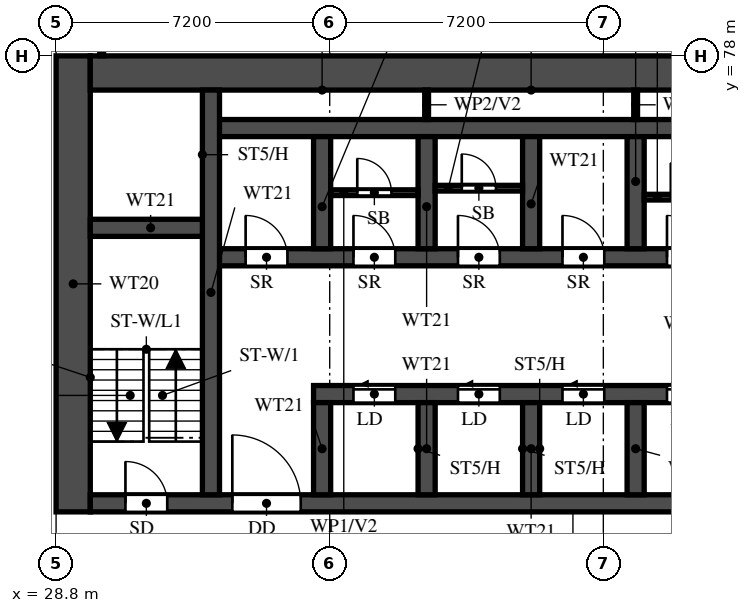
"""IFC4 building model, lengths in metres.
Left out: names, types, materials, properties, quantities, classifications, styles, units other than length and angle.
Written with IfcOpenShell. Run it as: python <this file> out.ifc"""

import sys

from ifc_helpers import new_model, si_unit, direction, frame, frame_2d, origin, place, context, subcontext, project, spatial, rectangle, extrude, element, fill, save


model = new_model("IFC4")
c1 = context("Model", 3, precision=1e-05, world=origin(), true_north=direction((0.0, 1.0)))
c2 = subcontext(c1, "Body", "Model", "MODEL_VIEW")
j1 = project(units=[si_unit("LENGTHUNIT", "METRE"), si_unit("PLANEANGLEUNIT", "RADIAN")], contexts=[c1])
p1 = place(None, origin())
s1 = spatial("IfcSite", under=j1, at=p1, CompositionType="ELEMENT")
p2 = place(p1, origin())
s2 = spatial("IfcBuilding", under=s1, at=p2, CompositionType="ELEMENT")
p3 = place(p2, frame((0.0, 0.0, 27.0)))
s3 = spatial("IfcBuildingStorey", under=s2, at=p3, CompositionType="ELEMENT", Elevation=27.0)
p4 = place(p3, frame((29.25, 66.0, 0.0), z_axis=(0.0, 0.0, 1.0), x_axis=(0.0, 1.0, 0.0)))
e1 = element("IfcWall", 1, at=p4, inside=s3, PredefinedType="SHEAR", context=c2, shape_type="SweptSolid", body=[
    extrude(rectangle(XDim=12.0, YDim=0.9, at=frame_2d((6.0, 0.0))), origin(), (0.0, 0.0, 1.0), 3.18),
])
p5 = place(p3, frame((29.7, 77.55, 0.0), z_axis=(0.0, 0.0, 1.0), x_axis=(1.0, 0.0, 0.0)))
e2 = element("IfcWall", 2, at=p5, inside=s3, PredefinedType="SHEAR", context=c2, shape_type="SweptSolid", body=[
    extrude(rectangle(XDim=41.4, YDim=0.9, at=frame_2d((20.7, 0.0))), origin(), (0.0, 0.0, 1.0), 3.18),
])
p6 = place(p3, frame((29.7, 66.225, 0.0), z_axis=(0.0, 0.0, 1.0), x_axis=(1.0, 0.0, 0.0)))
e3 = element("IfcWall", 3, at=p6, inside=s3, PredefinedType="SHEAR", context=c2, shape_type="SweptSolid", body=[
    extrude(rectangle(XDim=41.4, YDim=0.45, at=frame_2d((20.7, 0.0))), origin(), (0.0, 0.0, 1.0), 3.18),
])
p7 = place(p6, frame((0.925, 0.0, 0.0)))
e4 = element("IfcOpeningElement", 4, at=p7, cuts=e3, PredefinedType="OPENING", context=c2, shape_type="SweptSolid", body=[
    extrude(rectangle(XDim=1.1, YDim=2.1, at=frame_2d((0.55, 1.05))), frame((0.0, 0.235, 0.0), z_axis=(0.0, -1.0, 0.0), x_axis=(1.0, 0.0, 0.0)), (0.0, 0.0, 1.0), 0.47),
])
p8 = place(p6, frame((3.738, 0.0, 0.0)))
e5 = element("IfcOpeningElement", 5, at=p8, cuts=e3, PredefinedType="OPENING", context=c2, shape_type="SweptSolid", body=[
    extrude(rectangle(XDim=1.8, YDim=2.1, at=frame_2d((0.9, 1.05))), frame((0.0, 0.235, 0.0), z_axis=(0.0, -1.0, 0.0), x_axis=(1.0, 0.0, 0.0)), (0.0, 0.0, 1.0), 0.47),
])
p9 = place(p3, frame((35.575, 69.1, 0.0), z_axis=(0.0, 0.0, 1.0), x_axis=(1.0, 0.0, 0.0)))
e6 = element("IfcWall", 6, at=p9, inside=s3, PredefinedType="SHEAR", context=c2, shape_type="SweptSolid", body=[
    extrude(rectangle(XDim=24.2, YDim=0.45, at=frame_2d((12.1, 0.0))), origin(), (0.0, 0.0, 1.0), 3.18),
])
p10 = place(p9, frame((1.05, 0.0, 0.0)))
e7 = element("IfcOpeningElement", 7, at=p10, cuts=e6, PredefinedType="OPENING", context=c2, shape_type="SweptSolid", body=[
    extrude(rectangle(XDim=1.1, YDim=2.1, at=frame_2d((0.55, 1.05))), frame((0.0, 0.235, 0.0), z_axis=(0.0, -1.0, 0.0), x_axis=(1.0, 0.0, 0.0)), (0.0, 0.0, 1.0), 0.47),
])
p11 = place(p9, frame((3.8, 0.0, 0.0)))
e8 = element("IfcOpeningElement", 8, at=p11, cuts=e6, PredefinedType="OPENING", context=c2, shape_type="SweptSolid", body=[
    extrude(rectangle(XDim=1.1, YDim=2.1, at=frame_2d((0.55, 1.05))), frame((0.0, 0.235, 0.0), z_axis=(0.0, -1.0, 0.0), x_axis=(1.0, 0.0, 0.0)), (0.0, 0.0, 1.0), 0.47),
])
p12 = place(p9, frame((6.55, 0.0, 0.0)))
e9 = element("IfcOpeningElement", 9, at=p12, cuts=e6, PredefinedType="OPENING", context=c2, shape_type="SweptSolid", body=[
    extrude(rectangle(XDim=1.1, YDim=2.1, at=frame_2d((0.55, 1.05))), frame((0.0, 0.235, 0.0), z_axis=(0.0, -1.0, 0.0), x_axis=(1.0, 0.0, 0.0)), (0.0, 0.0, 1.0), 0.47),
])
p13 = place(p9, frame((9.3, 0.0, 0.0)))
e10 = element("IfcOpeningElement", 10, at=p13, cuts=e6, PredefinedType="OPENING", context=c2, shape_type="SweptSolid", body=[
    extrude(rectangle(XDim=1.1, YDim=2.1, at=frame_2d((0.55, 1.05))), frame((0.0, 0.235, 0.0), z_axis=(0.0, -1.0, 0.0), x_axis=(1.0, 0.0, 0.0)), (0.0, 0.0, 1.0), 0.47),
])
p14 = place(p9, frame((12.05, 0.0, 0.0)))
e11 = element("IfcOpeningElement", 11, at=p14, cuts=e6, PredefinedType="OPENING", context=c2, shape_type="SweptSolid", body=[
    extrude(rectangle(XDim=1.1, YDim=2.1, at=frame_2d((0.55, 1.05))), frame((0.0, 0.235, 0.0), z_axis=(0.0, -1.0, 0.0), x_axis=(1.0, 0.0, 0.0)), (0.0, 0.0, 1.0), 0.47),
])
p15 = place(p9, frame((14.8, 0.0, 0.0)))
e12 = element("IfcOpeningElement", 12, at=p15, cuts=e6, PredefinedType="OPENING", context=c2, shape_type="SweptSolid", body=[
    extrude(rectangle(XDim=1.1, YDim=2.1, at=frame_2d((0.55, 1.05))), frame((0.0, 0.235, 0.0), z_axis=(0.0, -1.0, 0.0), x_axis=(1.0, 0.0, 0.0)), (0.0, 0.0, 1.0), 0.47),
])
p16 = place(p3, frame((32.875, 72.7, 0.0), z_axis=(0.0, 0.0, 1.0), x_axis=(1.0, 0.0, 0.0)))
e13 = element("IfcWall", 13, at=p16, inside=s3, PredefinedType="SHEAR", context=c2, shape_type="SweptSolid", body=[
    extrude(rectangle(XDim=35.05, YDim=0.45, at=frame_2d((17.525, 0.0))), origin(), (0.0, 0.0, 1.0), 3.18),
])
p17 = place(p16, frame((19.8, 0.0, 0.0)))
e14 = element("IfcOpeningElement", 14, at=p17, cuts=e13, PredefinedType="OPENING", context=c2, shape_type="SweptSolid", body=[
    extrude(rectangle(XDim=1.1, YDim=2.1, at=frame_2d((0.55, 1.05))), frame((0.0, 0.235, 0.0), z_axis=(0.0, -1.0, 0.0), x_axis=(1.0, 0.0, 0.0)), (0.0, 0.0, 1.0), 0.47),
])
p18 = place(p16, frame((27.65, 0.0, 0.0)))
e15 = element("IfcOpeningElement", 15, at=p18, cuts=e13, PredefinedType="OPENING", context=c2, shape_type="SweptSolid", body=[
    extrude(rectangle(XDim=1.1, YDim=2.1, at=frame_2d((0.55, 1.05))), frame((0.0, 0.235, 0.0), z_axis=(0.0, -1.0, 0.0), x_axis=(1.0, 0.0, 0.0)), (0.0, 0.0, 1.0), 0.47),
])
p19 = place(p16, frame((30.25, 0.0, 0.0)))
e16 = element("IfcOpeningElement", 16, at=p19, cuts=e13, PredefinedType="OPENING", context=c2, shape_type="SweptSolid", body=[
    extrude(rectangle(XDim=1.1, YDim=2.1, at=frame_2d((0.55, 1.05))), frame((0.0, 0.235, 0.0), z_axis=(0.0, -1.0, 0.0), x_axis=(1.0, 0.0, 0.0)), (0.0, 0.0, 1.0), 0.47),
])
p20 = place(p16, frame((3.75, 0.0, 0.0)))
e17 = element("IfcOpeningElement", 17, at=p20, cuts=e13, PredefinedType="OPENING", context=c2, shape_type="SweptSolid", body=[
    extrude(rectangle(XDim=1.1, YDim=2.1, at=frame_2d((0.55, 1.05))), frame((0.0, 0.235, 0.0), z_axis=(0.0, -1.0, 0.0), x_axis=(1.0, 0.0, 0.0)), (0.0, 0.0, 1.0), 0.47),
])
p21 = place(p16, frame((6.5, 0.0, 0.0)))
e18 = element("IfcOpeningElement", 18, at=p21, cuts=e13, PredefinedType="OPENING", context=c2, shape_type="SweptSolid", body=[
    extrude(rectangle(XDim=1.1, YDim=2.1, at=frame_2d((0.55, 1.05))), frame((0.0, 0.235, 0.0), z_axis=(0.0, -1.0, 0.0), x_axis=(1.0, 0.0, 0.0)), (0.0, 0.0, 1.0), 0.47),
])
p22 = place(p16, frame((9.25, 0.0, 0.0)))
e19 = element("IfcOpeningElement", 19, at=p22, cuts=e13, PredefinedType="OPENING", context=c2, shape_type="SweptSolid", body=[
    extrude(rectangle(XDim=1.1, YDim=2.1, at=frame_2d((0.55, 1.05))), frame((0.0, 0.235, 0.0), z_axis=(0.0, -1.0, 0.0), x_axis=(1.0, 0.0, 0.0)), (0.0, 0.0, 1.0), 0.47),
])
p23 = place(p16, frame((12.0, 0.0, 0.0)))
e20 = element("IfcOpeningElement", 20, at=p23, cuts=e13, PredefinedType="OPENING", context=c2, shape_type="SweptSolid", body=[
    extrude(rectangle(XDim=1.1, YDim=2.1, at=frame_2d((0.55, 1.05))), frame((0.0, 0.235, 0.0), z_axis=(0.0, -1.0, 0.0), x_axis=(1.0, 0.0, 0.0)), (0.0, 0.0, 1.0), 0.47),
])
p24 = place(p16, frame((14.75, 0.0, 0.0)))
e21 = element("IfcOpeningElement", 21, at=p24, cuts=e13, PredefinedType="OPENING", context=c2, shape_type="SweptSolid", body=[
    extrude(rectangle(XDim=1.1, YDim=2.1, at=frame_2d((0.55, 1.05))), frame((0.0, 0.235, 0.0), z_axis=(0.0, -1.0, 0.0), x_axis=(1.0, 0.0, 0.0)), (0.0, 0.0, 1.0), 0.47),
])
p25 = place(p16, frame((17.5, 0.0, 0.0)))
e22 = element("IfcOpeningElement", 22, at=p25, cuts=e13, PredefinedType="OPENING", context=c2, shape_type="SweptSolid", body=[
    extrude(rectangle(XDim=1.1, YDim=2.1, at=frame_2d((0.55, 1.05))), frame((0.0, 0.235, 0.0), z_axis=(0.0, -1.0, 0.0), x_axis=(1.0, 0.0, 0.0)), (0.0, 0.0, 1.0), 0.47),
])
p26 = place(p16, frame((0.913, 0.0, 0.0)))
e23 = element("IfcOpeningElement", 23, at=p26, cuts=e13, PredefinedType="OPENING", context=c2, shape_type="SweptSolid", body=[
    extrude(rectangle(XDim=1.1, YDim=2.1, at=frame_2d((0.55, 1.05))), frame((0.0, 0.235, 0.0), z_axis=(0.0, -1.0, 0.0), x_axis=(1.0, 0.0, 0.0)), (0.0, 0.0, 1.0), 0.47),
])
p27 = place(p3, frame((32.875, 76.1, 0.0), z_axis=(0.0, 0.0, 1.0), x_axis=(1.0, 0.0, 0.0)))
e24 = element("IfcWall", 24, at=p27, inside=s3, PredefinedType="SHEAR", context=c2, shape_type="SweptSolid", body=[
    extrude(rectangle(XDim=35.05, YDim=0.45, at=frame_2d((17.525, 0.0))), origin(), (0.0, 0.0, 1.0), 3.18),
])
p28 = place(p3, frame((29.7, 73.475, 0.0), z_axis=(0.0, 0.0, 1.0), x_axis=(1.0, 0.0, 0.0)))
e25 = element("IfcWall", 25, at=p28, inside=s3, PredefinedType="SHEAR", context=c2, shape_type="SweptSolid", body=[
    extrude(rectangle(XDim=3.175, YDim=0.45, at=frame_2d((1.587, 0.0))), origin(), (0.0, 0.0, 1.0), 3.18),
])
p29 = place(p3, frame((32.875, 66.45, 0.0), z_axis=(0.0, 0.0, 1.0), x_axis=(0.0, 1.0, 0.0)))
e26 = element("IfcWall", 26, at=p29, inside=s3, PredefinedType="SHEAR", context=c2, shape_type="SweptSolid", body=[
    extrude(rectangle(XDim=10.65, YDim=0.45, at=frame_2d((5.325, 0.0))), origin(), (0.0, 0.0, 1.0), 3.18),
])
for number, where, z_axis, x_axis in (
    (27, (35.8, 66.45, 0.0), (0.0, 0.0, 1.0), (0.0, 1.0, 0.0)),
    (28, (38.55, 66.45, 0.0), (0.0, 0.0, 1.0), (0.0, 1.0, 0.0)),
    (29, (41.3, 66.45, 0.0), (0.0, 0.0, 1.0), (0.0, 1.0, 0.0)),
    (30, (44.05, 66.45, 0.0), (0.0, 0.0, 1.0), (0.0, 1.0, 0.0)),
):
    element("IfcWall", number, at=place(p3, frame(where, z_axis=z_axis, x_axis=x_axis)), inside=s3, PredefinedType="SHEAR", context=c2, shape_type="SweptSolid", body=[
        extrude(rectangle(XDim=2.425, YDim=0.45, at=frame_2d((1.212, 0.0))), origin(), (0.0, 0.0, 1.0), 3.18),
    ])
for number, where, z_axis, x_axis in (
    (31, (35.8, 72.925, 0.0), (0.0, 0.0, 1.0), (0.0, 1.0, 0.0)),
    (32, (38.55, 72.925, 0.0), (0.0, 0.0, 1.0), (0.0, 1.0, 0.0)),
    (33, (41.3, 72.925, 0.0), (0.0, 0.0, 1.0), (0.0, 1.0, 0.0)),
    (34, (44.05, 72.925, 0.0), (0.0, 0.0, 1.0), (0.0, 1.0, 0.0)),
):
    element("IfcWall", number, at=place(p3, frame(where, z_axis=z_axis, x_axis=x_axis)), inside=s3, PredefinedType="SHEAR", context=c2, shape_type="SweptSolid", body=[
        extrude(rectangle(XDim=2.95, YDim=0.45, at=frame_2d((1.475, 0.0))), origin(), (0.0, 0.0, 1.0), 3.18),
    ])
p30 = place(p3, frame((36.025, 74.4, 0.0), z_axis=(0.0, 0.0, 1.0), x_axis=(1.0, 0.0, 0.0)))
e35 = element("IfcWall", 35, at=p30, inside=s3, PredefinedType="PARTITIONING", context=c2, shape_type="SweptSolid", body=[
    extrude(rectangle(XDim=2.3, YDim=0.15, at=frame_2d((1.15, 0.0))), origin(), (0.0, 0.0, 1.0), 3.18),
])
p31 = place(p30, frame((0.7, 0.0, 0.0)))
e36 = element("IfcOpeningElement", 36, at=p31, cuts=e35, PredefinedType="OPENING", context=c2, shape_type="SweptSolid", body=[
    extrude(rectangle(XDim=0.9, YDim=2.1, at=frame_2d((0.45, 1.05))), frame((0.0, 0.085, 0.0), z_axis=(0.0, -1.0, 0.0), x_axis=(1.0, 0.0, 0.0)), (0.0, 0.0, 1.0), 0.17),
])
p32 = place(p3, frame((38.775, 74.518, 0.0), z_axis=(0.0, 0.0, 1.0), x_axis=(1.0, 0.0, 0.0)))
e37 = element("IfcWall", 37, at=p32, inside=s3, PredefinedType="PARTITIONING", context=c2, shape_type="SweptSolid", body=[
    extrude(rectangle(XDim=2.3, YDim=0.15, at=frame_2d((1.15, 0.0))), origin(), (0.0, 0.0, 1.0), 3.18),
])
p33 = place(p32, frame((0.7, 0.0, 0.0)))
e38 = element("IfcOpeningElement", 38, at=p33, cuts=e37, PredefinedType="OPENING", context=c2, shape_type="SweptSolid", body=[
    extrude(rectangle(XDim=0.9, YDim=2.1, at=frame_2d((0.45, 1.05))), frame((0.0, 0.085, 0.0), z_axis=(0.0, -1.0, 0.0), x_axis=(1.0, 0.0, 0.0)), (0.0, 0.0, 1.0), 0.17),
])
p34 = place(p3, frame((44.275, 74.282, 0.0), z_axis=(0.0, 0.0, 1.0), x_axis=(1.0, 0.0, 0.0)))
e39 = element("IfcWall", 39, at=p34, inside=s3, PredefinedType="PARTITIONING", context=c2, shape_type="SweptSolid", body=[
    extrude(rectangle(XDim=2.3, YDim=0.15, at=frame_2d((1.15, 0.0))), origin(), (0.0, 0.0, 1.0), 3.18),
])
p35 = place(p34, frame((0.7, 0.0, 0.0)))
e40 = element("IfcOpeningElement", 40, at=p35, cuts=e39, PredefinedType="OPENING", context=c2, shape_type="SweptSolid", body=[
    extrude(rectangle(XDim=0.9, YDim=2.1, at=frame_2d((0.45, 1.05))), frame((0.0, 0.085, 0.0), z_axis=(0.0, -1.0, 0.0), x_axis=(1.0, 0.0, 0.0)), (0.0, 0.0, 1.0), 0.17),
])
for number, where, z_axis, x_axis in (
    (41, (38.55, 76.325, 0.0), (0.0, 0.0, 1.0), (0.0, 1.0, 0.0)),
    (42, (44.05, 76.325, 0.0), (0.0, 0.0, 1.0), (0.0, 1.0, 0.0)),
):
    element("IfcWall", number, at=place(p3, frame(where, z_axis=z_axis, x_axis=x_axis)), inside=s3, PredefinedType="PARTITIONING", context=c2, shape_type="SweptSolid", body=[
        extrude(rectangle(XDim=0.775, YDim=0.1, at=frame_2d((0.388, 0.0))), origin(), (0.0, 0.0, 1.0), 3.18),
    ])
p36 = place(p3, frame((30.0, 78.002, 0.0), z_axis=(0.0, 0.0, 1.0), x_axis=(0.0, 1.0, 0.0)))
e43 = element("IfcWall", 43, at=p36, inside=s3, PredefinedType="PARTITIONING", context=c2, shape_type="SweptSolid", body=[
    extrude(rectangle(XDim=2.228, YDim=0.1, at=frame_2d((1.114, 0.0))), origin(), (0.0, 0.0, 1.0), 2.28),
])
p37 = place(p7, origin())
e44 = element("IfcDoor", 44, at=p37, inside=s3, OperationType="SINGLE_SWING_LEFT", PredefinedType="DOOR", context=c2, shape_type="SweptSolid", body=[
    extrude(rectangle(XDim=1.1, YDim=2.1, at=frame_2d((0.55, 1.05))), frame((0.0, 0.025, 0.0), z_axis=(0.0, -1.0, 0.0), x_axis=(1.0, 0.0, 0.0)), (0.0, 0.0, 1.0), 0.05),
])
fill(e4, e44)
p38 = place(p8, origin())
e45 = element("IfcDoor", 45, at=p38, inside=s3, OperationType="DOUBLE_DOOR_SINGLE_SWING", PredefinedType="DOOR", context=c2, shape_type="SweptSolid", body=[
    extrude(rectangle(XDim=1.8, YDim=2.1, at=frame_2d((0.9, 1.05))), frame((0.0, 0.025, 0.0), z_axis=(0.0, -1.0, 0.0), x_axis=(1.0, 0.0, 0.0)), (0.0, 0.0, 1.0), 0.05),
])
fill(e5, e45)
p39 = place(p10, origin())
e46 = element("IfcDoor", 46, at=p39, inside=s3, OperationType="SLIDING_TO_LEFT", PredefinedType="DOOR", context=c2, shape_type="SweptSolid", body=[
    extrude(rectangle(XDim=1.1, YDim=2.1, at=frame_2d((0.55, 1.05))), frame((0.0, 0.025, 0.0), z_axis=(0.0, -1.0, 0.0), x_axis=(1.0, 0.0, 0.0)), (0.0, 0.0, 1.0), 0.05),
])
fill(e7, e46)
p40 = place(p11, origin())
e47 = element("IfcDoor", 47, at=p40, inside=s3, OperationType="SLIDING_TO_LEFT", PredefinedType="DOOR", context=c2, shape_type="SweptSolid", body=[
    extrude(rectangle(XDim=1.1, YDim=2.1, at=frame_2d((0.55, 1.05))), frame((0.0, 0.025, 0.0), z_axis=(0.0, -1.0, 0.0), x_axis=(1.0, 0.0, 0.0)), (0.0, 0.0, 1.0), 0.05),
])
fill(e8, e47)
p41 = place(p12, origin())
e48 = element("IfcDoor", 48, at=p41, inside=s3, OperationType="SLIDING_TO_LEFT", PredefinedType="DOOR", context=c2, shape_type="SweptSolid", body=[
    extrude(rectangle(XDim=1.1, YDim=2.1, at=frame_2d((0.55, 1.05))), frame((0.0, 0.025, 0.0), z_axis=(0.0, -1.0, 0.0), x_axis=(1.0, 0.0, 0.0)), (0.0, 0.0, 1.0), 0.05),
])
fill(e9, e48)
p42 = place(p13, origin())
e49 = element("IfcDoor", 49, at=p42, inside=s3, OperationType="SLIDING_TO_LEFT", PredefinedType="DOOR", context=c2, shape_type="SweptSolid", body=[
    extrude(rectangle(XDim=1.1, YDim=2.1, at=frame_2d((0.55, 1.05))), frame((0.0, 0.025, 0.0), z_axis=(0.0, -1.0, 0.0), x_axis=(1.0, 0.0, 0.0)), (0.0, 0.0, 1.0), 0.05),
])
fill(e10, e49)
p43 = place(p20, origin())
e50 = element("IfcDoor", 50, at=p43, inside=s3, OperationType="SINGLE_SWING_LEFT", PredefinedType="DOOR", context=c2, shape_type="SweptSolid", body=[
    extrude(rectangle(XDim=1.1, YDim=2.1, at=frame_2d((0.55, 1.05))), frame((0.0, 0.025, 0.0), z_axis=(0.0, -1.0, 0.0), x_axis=(1.0, 0.0, 0.0)), (0.0, 0.0, 1.0), 0.05),
])
fill(e17, e50)
p44 = place(p31, origin())
e51 = element("IfcDoor", 51, at=p44, inside=s3, OperationType="SINGLE_SWING_LEFT", PredefinedType="DOOR", context=c2, shape_type="SweptSolid", body=[
    extrude(rectangle(XDim=0.9, YDim=2.1, at=frame_2d((0.45, 1.05))), frame((0.0, 0.025, 0.0), z_axis=(0.0, -1.0, 0.0), x_axis=(1.0, 0.0, 0.0)), (0.0, 0.0, 1.0), 0.05),
])
fill(e36, e51)
p45 = place(p21, origin())
e52 = element("IfcDoor", 52, at=p45, inside=s3, OperationType="SINGLE_SWING_LEFT", PredefinedType="DOOR", context=c2, shape_type="SweptSolid", body=[
    extrude(rectangle(XDim=1.1, YDim=2.1, at=frame_2d((0.55, 1.05))), frame((0.0, 0.025, 0.0), z_axis=(0.0, -1.0, 0.0), x_axis=(1.0, 0.0, 0.0)), (0.0, 0.0, 1.0), 0.05),
])
fill(e18, e52)
p46 = place(p33, origin())
e53 = element("IfcDoor", 53, at=p46, inside=s3, OperationType="SINGLE_SWING_LEFT", PredefinedType="DOOR", context=c2, shape_type="SweptSolid", body=[
    extrude(rectangle(XDim=0.9, YDim=2.1, at=frame_2d((0.45, 1.05))), frame((0.0, 0.025, 0.0), z_axis=(0.0, -1.0, 0.0), x_axis=(1.0, 0.0, 0.0)), (0.0, 0.0, 1.0), 0.05),
])
fill(e38, e53)
p47 = place(p22, origin())
e54 = element("IfcDoor", 54, at=p47, inside=s3, OperationType="SINGLE_SWING_LEFT", PredefinedType="DOOR", context=c2, shape_type="SweptSolid", body=[
    extrude(rectangle(XDim=1.1, YDim=2.1, at=frame_2d((0.55, 1.05))), frame((0.0, 0.025, 0.0), z_axis=(0.0, -1.0, 0.0), x_axis=(1.0, 0.0, 0.0)), (0.0, 0.0, 1.0), 0.05),
])
fill(e19, e54)
p48 = place(p23, origin())
e55 = element("IfcDoor", 55, at=p48, inside=s3, OperationType="SINGLE_SWING_LEFT", PredefinedType="DOOR", context=c2, shape_type="SweptSolid", body=[
    extrude(rectangle(XDim=1.1, YDim=2.1, at=frame_2d((0.55, 1.05))), frame((0.0, 0.025, 0.0), z_axis=(0.0, -1.0, 0.0), x_axis=(1.0, 0.0, 0.0)), (0.0, 0.0, 1.0), 0.05),
])
fill(e20, e55)
p49 = place(p35, origin())
e56 = element("IfcDoor", 56, at=p49, inside=s3, OperationType="SINGLE_SWING_RIGHT", PredefinedType="DOOR", context=c2, shape_type="SweptSolid", body=[
    extrude(rectangle(XDim=0.9, YDim=2.1, at=frame_2d((0.45, 1.05))), frame((0.0, 0.025, 0.0), z_axis=(0.0, -1.0, 0.0), x_axis=(1.0, 0.0, 0.0)), (0.0, 0.0, 1.0), 0.05),
])
fill(e40, e56)
p50 = place(p26, origin())
e57 = element("IfcDoor", 57, at=p50, inside=s3, OperationType="SINGLE_SWING_LEFT", PredefinedType="DOOR", context=c2, shape_type="SweptSolid", body=[
    extrude(rectangle(XDim=1.1, YDim=2.1, at=frame_2d((0.55, 1.05))), frame((0.0, 0.025, 0.0), z_axis=(0.0, -1.0, 0.0), x_axis=(1.0, 0.0, 0.0)), (0.0, 0.0, 1.0), 0.05),
])
fill(e23, e57)
save(model, sys.argv[1])
